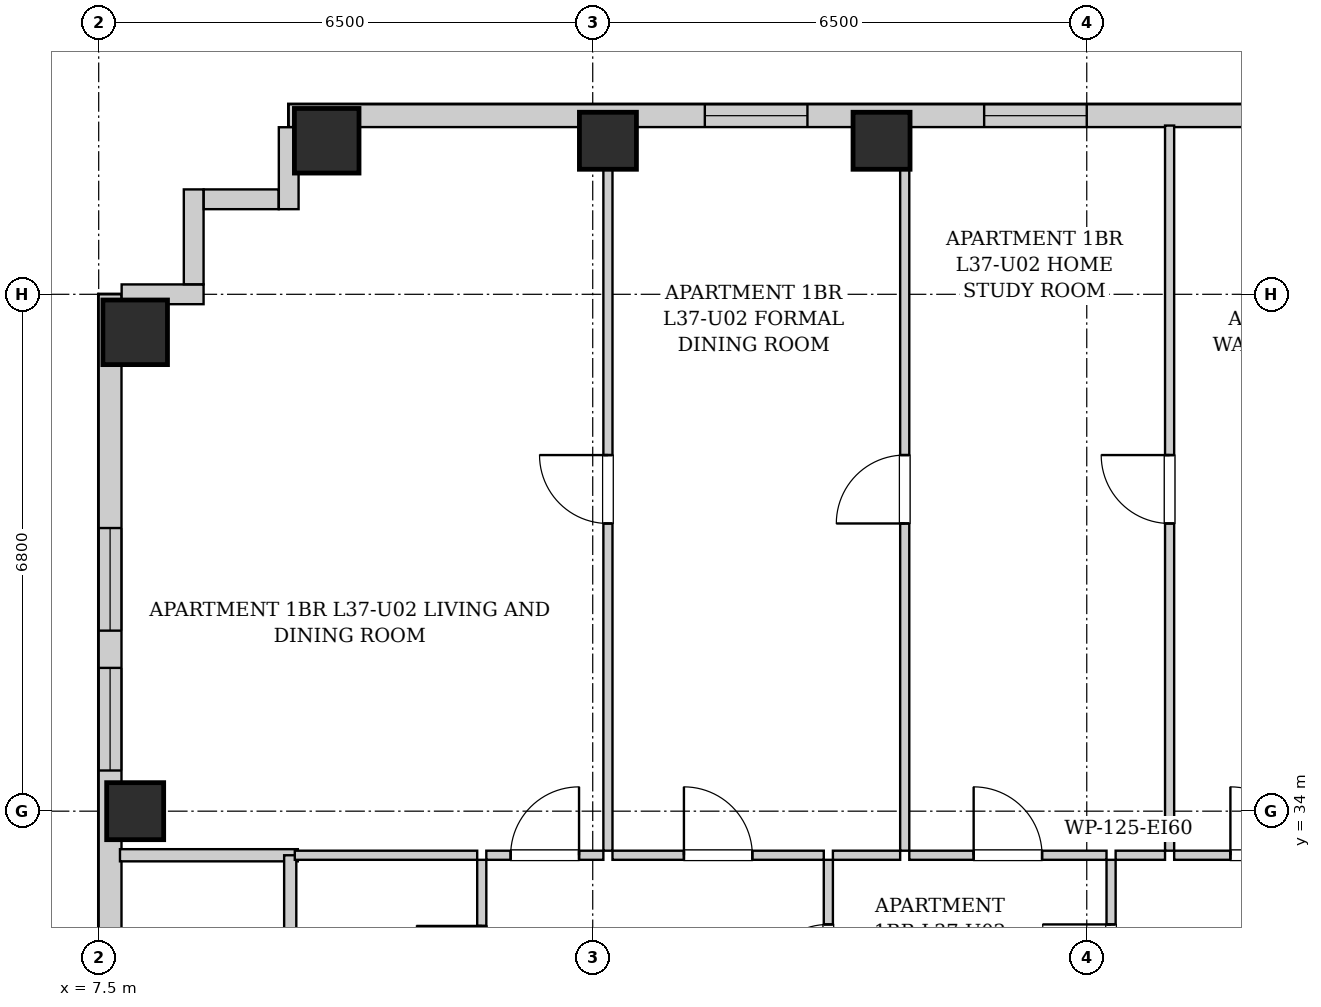
"""IFC4 building model, lengths in metres.
Left out: names, types, materials, properties, quantities, classifications, styles, units other than length and angle.
Written with IfcOpenShell. Run it as: python <this file> out.ifc"""

import sys

from ifc_helpers import new_model, si_unit, direction, frame, frame_2d, origin, origin_2d, place, context, subcontext, project, spatial, rectangle, extrude, element, fill, save


model = new_model("IFC4")
c1 = context("Model", 3, precision=1e-05, world=origin(), true_north=direction((0.0, 1.0)))
c2 = subcontext(c1, "Body", "Model", "MODEL_VIEW")
j1 = project(units=[si_unit("LENGTHUNIT", "METRE"), si_unit("PLANEANGLEUNIT", "RADIAN")], contexts=[c1])
p1 = place(None, origin())
s1 = spatial("IfcSite", under=j1, at=p1, CompositionType="ELEMENT")
p2 = place(p1, origin())
s2 = spatial("IfcBuilding", under=s1, at=p2, CompositionType="ELEMENT")
p3 = place(p2, frame((0.0, 0.0, 130.9)))
s3 = spatial("IfcBuildingStorey", under=s2, at=p3, CompositionType="ELEMENT", Elevation=130.9)
p4 = place(p3, frame((10.5, 42.82, 0.0), z_axis=(0.0, 0.0, 1.0), x_axis=(1.0, 0.0, 0.0)))
e1 = element("IfcColumn", 1, at=p4, inside=s3, PredefinedType="COLUMN", context=c2, shape_type="SweptSolid", body=[
    extrude(rectangle(XDim=0.85, YDim=0.85, at=origin_2d()), origin(), (0.0, 0.0, 1.0), 3.25),
])
for number, where, z_axis, x_axis in (
    (2, (14.2, 42.82, 0.0), (0.0, 0.0, 1.0), (1.0, 0.0, 0.0)),
    (3, (17.8, 42.82, 0.0), (0.0, 0.0, 1.0), (1.0, 0.0, 0.0)),
    (4, (7.98, 34.0, 0.0), (0.0, 0.0, 1.0), (1.0, 0.0, 0.0)),
):
    element("IfcColumn", number, at=place(p3, frame(where, z_axis=z_axis, x_axis=x_axis)), inside=s3, PredefinedType="COLUMN", context=c2, shape_type="SweptSolid", body=[
        extrude(rectangle(XDim=0.75, YDim=0.75, at=origin_2d()), origin(), (0.0, 0.0, 1.0), 3.25),
    ])
p5 = place(p3, frame((7.98, 40.3, 0.0), z_axis=(0.0, 0.0, 1.0), x_axis=(1.0, 0.0, 0.0)))
e5 = element("IfcColumn", 5, at=p5, inside=s3, PredefinedType="COLUMN", context=c2, shape_type="SweptSolid", body=[
    extrude(rectangle(XDim=0.85, YDim=0.85, at=origin_2d()), origin(), (0.0, 0.0, 1.0), 3.25),
])
p6 = place(p3, frame((10.0, 43.15, 0.0), z_axis=(0.0, 0.0, 1.0), x_axis=(1.0, 0.0, 0.0)))
e6 = element("IfcWall", 6, at=p6, inside=s3, PredefinedType="SOLIDWALL", context=c2, shape_type="SweptSolid", body=[
    extrude(rectangle(XDim=21.9, YDim=0.3, at=frame_2d((10.95, 0.0))), origin(), (0.0, 0.0, 1.0), 2.99),
])
p7 = place(p6, frame((5.475, 0.0, 0.55)))
e7 = element("IfcOpeningElement", 7, at=p7, cuts=e6, PredefinedType="OPENING", context=c2, shape_type="SweptSolid", body=[
    extrude(rectangle(XDim=1.35, YDim=1.2, at=frame_2d((0.675, 0.6))), frame((0.0, 0.16, 0.0), z_axis=(0.0, -1.0, 0.0), x_axis=(1.0, 0.0, 0.0)), (0.0, 0.0, 1.0), 0.32),
])
p8 = place(p6, frame((9.15, 0.0, 0.55)))
e8 = element("IfcOpeningElement", 8, at=p8, cuts=e6, PredefinedType="OPENING", context=c2, shape_type="SweptSolid", body=[
    extrude(rectangle(XDim=1.35, YDim=1.2, at=frame_2d((0.675, 0.6))), frame((0.0, 0.16, 0.0), z_axis=(0.0, -1.0, 0.0), x_axis=(1.0, 0.0, 0.0)), (0.0, 0.0, 1.0), 0.32),
])
p9 = place(p6, frame((17.5, 0.0, 0.55)))
e9 = element("IfcOpeningElement", 9, at=p9, cuts=e6, PredefinedType="OPENING", context=c2, shape_type="SweptSolid", body=[
    extrude(rectangle(XDim=1.35, YDim=1.2, at=frame_2d((0.675, 0.6))), frame((0.0, 0.16, 0.0), z_axis=(0.0, -1.0, 0.0), x_axis=(1.0, 0.0, 0.0)), (0.0, 0.0, 1.0), 0.32),
])
p10 = place(p6, frame((19.8, 0.0, 0.55)))
e10 = element("IfcOpeningElement", 10, at=p10, cuts=e6, PredefinedType="OPENING", context=c2, shape_type="SweptSolid", body=[
    extrude(rectangle(XDim=1.35, YDim=1.2, at=frame_2d((0.675, 0.6))), frame((0.0, 0.16, 0.0), z_axis=(0.0, -1.0, 0.0), x_axis=(1.0, 0.0, 0.0)), (0.0, 0.0, 1.0), 0.32),
])
p11 = place(p3, frame((7.65, 6.3, 0.0), z_axis=(0.0, 0.0, 1.0), x_axis=(0.0, 1.0, 0.0)))
e11 = element("IfcWall", 11, at=p11, inside=s3, PredefinedType="SOLIDWALL", context=c2, shape_type="SweptSolid", body=[
    extrude(rectangle(XDim=34.5, YDim=0.3, at=frame_2d((17.25, 0.0))), origin(), (0.0, 0.0, 1.0), 2.99),
])
p12 = place(p11, frame((1.575, 0.0, 0.55)))
e12 = element("IfcOpeningElement", 12, at=p12, cuts=e11, PredefinedType="OPENING", context=c2, shape_type="SweptSolid", body=[
    extrude(rectangle(XDim=1.35, YDim=1.2, at=frame_2d((0.675, 0.6))), frame((0.0, 0.16, 0.0), z_axis=(0.0, -1.0, 0.0), x_axis=(1.0, 0.0, 0.0)), (0.0, 0.0, 1.0), 0.32),
])
p13 = place(p11, frame((30.075, 0.0, 0.55)))
e13 = element("IfcOpeningElement", 13, at=p13, cuts=e11, PredefinedType="OPENING", context=c2, shape_type="SweptSolid", body=[
    extrude(rectangle(XDim=1.35, YDim=1.2, at=frame_2d((0.675, 0.6))), frame((0.0, 0.16, 0.0), z_axis=(0.0, -1.0, 0.0), x_axis=(1.0, 0.0, 0.0)), (0.0, 0.0, 1.0), 0.32),
])
p14 = place(p11, frame((28.235, 0.0, 0.55)))
e14 = element("IfcOpeningElement", 14, at=p14, cuts=e11, PredefinedType="OPENING", context=c2, shape_type="SweptSolid", body=[
    extrude(rectangle(XDim=1.35, YDim=1.2, at=frame_2d((0.675, 0.6))), frame((0.0, 0.16, 0.0), z_axis=(0.0, -1.0, 0.0), x_axis=(1.0, 0.0, 0.0)), (0.0, 0.0, 1.0), 0.32),
])
p15 = place(p11, frame((11.175, 0.0, 0.55)))
e15 = element("IfcOpeningElement", 15, at=p15, cuts=e11, PredefinedType="OPENING", context=c2, shape_type="SweptSolid", body=[
    extrude(rectangle(XDim=1.35, YDim=1.2, at=frame_2d((0.675, 0.6))), frame((0.0, 0.16, 0.0), z_axis=(0.0, -1.0, 0.0), x_axis=(1.0, 0.0, 0.0)), (0.0, 0.0, 1.0), 0.32),
])
p16 = place(p11, frame((9.235, 0.0, 0.55)))
e16 = element("IfcOpeningElement", 16, at=p16, cuts=e11, PredefinedType="OPENING", context=c2, shape_type="SweptSolid", body=[
    extrude(rectangle(XDim=1.35, YDim=1.2, at=frame_2d((0.675, 0.6))), frame((0.0, 0.16, 0.0), z_axis=(0.0, -1.0, 0.0), x_axis=(1.0, 0.0, 0.0)), (0.0, 0.0, 1.0), 0.32),
])
p17 = place(p11, frame((18.2, 0.0, 0.55)))
e17 = element("IfcOpeningElement", 17, at=p17, cuts=e11, PredefinedType="OPENING", context=c2, shape_type="SweptSolid", body=[
    extrude(rectangle(XDim=1.35, YDim=1.2, at=frame_2d((0.675, 0.6))), frame((0.0, 0.16, 0.0), z_axis=(0.0, -1.0, 0.0), x_axis=(1.0, 0.0, 0.0)), (0.0, 0.0, 1.0), 0.32),
])
p18 = place(p11, frame((19.81, 0.0, 0.55)))
e18 = element("IfcOpeningElement", 18, at=p18, cuts=e11, PredefinedType="OPENING", context=c2, shape_type="SweptSolid", body=[
    extrude(rectangle(XDim=1.35, YDim=1.2, at=frame_2d((0.675, 0.6))), frame((0.0, 0.16, 0.0), z_axis=(0.0, -1.0, 0.0), x_axis=(1.0, 0.0, 0.0)), (0.0, 0.0, 1.0), 0.32),
])
p19 = place(p3, frame((7.802, 40.8, 0.0), z_axis=(0.0, 0.0, 1.0), x_axis=(1.0, 0.0, 0.0)))
e19 = element("IfcWall", 19, at=p19, inside=s3, PredefinedType="SOLIDWALL", context=c2, shape_type="SweptSolid", body=[
    extrude(rectangle(XDim=1.078, YDim=0.26, at=frame_2d((0.539, 0.0))), origin(), (0.0, 0.0, 1.0), 2.99),
])
p20 = place(p3, frame((8.75, 40.932, 0.0), z_axis=(0.0, 0.0, 1.0), x_axis=(0.0, 1.0, 0.0)))
e20 = element("IfcWall", 20, at=p20, inside=s3, PredefinedType="SOLIDWALL", context=c2, shape_type="SweptSolid", body=[
    extrude(rectangle(XDim=1.248, YDim=0.26, at=frame_2d((0.624, 0.0))), origin(), (0.0, 0.0, 1.0), 2.99),
])
p21 = place(p3, frame((8.882, 42.05, 0.0), z_axis=(0.0, 0.0, 1.0), x_axis=(1.0, 0.0, 0.0)))
e21 = element("IfcWall", 21, at=p21, inside=s3, PredefinedType="SOLIDWALL", context=c2, shape_type="SweptSolid", body=[
    extrude(rectangle(XDim=0.986, YDim=0.26, at=frame_2d((0.493, 0.0))), origin(), (0.0, 0.0, 1.0), 2.99),
])
p22 = place(p3, frame((10.0, 41.92, 0.0), z_axis=(0.0, 0.0, 1.0), x_axis=(0.0, 1.0, 0.0)))
e22 = element("IfcWall", 22, at=p22, inside=s3, PredefinedType="SOLIDWALL", context=c2, shape_type="SweptSolid", body=[
    extrude(rectangle(XDim=1.078, YDim=0.26, at=frame_2d((0.539, 0.0))), origin(), (0.0, 0.0, 1.0), 2.99),
])
p23 = place(p3, frame((7.78, 33.42, 0.0), z_axis=(0.0, 0.0, 1.0), x_axis=(1.0, 0.0, 0.0)))
e23 = element("IfcWall", 23, at=p23, inside=s3, PredefinedType="PARTITIONING", context=c2, shape_type="SweptSolid", body=[
    extrude(rectangle(XDim=2.34, YDim=0.16, at=frame_2d((1.17, 0.0))), origin(), (0.0, 0.0, 1.0), 2.99),
])
p24 = place(p3, frame((10.02, 30.76, 0.0), z_axis=(0.0, 0.0, 1.0), x_axis=(0.0, 1.0, 0.0)))
e24 = element("IfcWall", 24, at=p24, inside=s3, PredefinedType="PARTITIONING", context=c2, shape_type="SweptSolid", body=[
    extrude(rectangle(XDim=2.66, YDim=0.16, at=frame_2d((1.33, 0.0))), origin(), (0.0, 0.0, 1.0), 2.99),
])
p25 = place(p3, frame((12.54, 30.76, 0.0), z_axis=(0.0, 0.0, 1.0), x_axis=(0.0, 1.0, 0.0)))
e25 = element("IfcWall", 25, at=p25, inside=s3, PredefinedType="PARTITIONING", context=c2, shape_type="SweptSolid", body=[
    extrude(rectangle(XDim=2.6, YDim=0.12, at=frame_2d((1.3, 0.0))), origin(), (0.0, 0.0, 1.0), 2.99),
])
p26 = place(p25, frame((0.87, 0.0, 0.0)))
e26 = element("IfcOpeningElement", 26, at=p26, cuts=e25, PredefinedType="OPENING", context=c2, shape_type="SweptSolid", body=[
    extrude(rectangle(XDim=0.86, YDim=2.05, at=frame_2d((0.43, 1.025))), frame((0.0, 0.07, 0.0), z_axis=(0.0, -1.0, 0.0), x_axis=(1.0, 0.0, 0.0)), (0.0, 0.0, 1.0), 0.14),
])
p27 = place(p3, frame((10.08, 33.42, 0.0), z_axis=(0.0, 0.0, 1.0), x_axis=(1.0, 0.0, 0.0)))
e27 = element("IfcWall", 27, at=p27, inside=s3, PredefinedType="PARTITIONING", context=c2, shape_type="SweptSolid", body=[
    extrude(rectangle(XDim=2.4, YDim=0.12, at=frame_2d((1.2, 0.0))), origin(), (0.0, 0.0, 1.0), 2.99),
])
p28 = place(p3, frame((17.1, 30.76, 0.0), z_axis=(0.0, 0.0, 1.0), x_axis=(0.0, 1.0, 0.0)))
e28 = element("IfcWall", 28, at=p28, inside=s3, PredefinedType="PARTITIONING", context=c2, shape_type="SweptSolid", body=[
    extrude(rectangle(XDim=2.6, YDim=0.12, at=frame_2d((1.3, 0.0))), origin(), (0.0, 0.0, 1.0), 2.99),
])
p29 = place(p28, frame((0.85, 0.0, 0.0)))
e29 = element("IfcOpeningElement", 29, at=p29, cuts=e28, PredefinedType="OPENING", context=c2, shape_type="SweptSolid", body=[
    extrude(rectangle(XDim=0.9, YDim=2.05, at=frame_2d((0.45, 1.025))), frame((0.0, 0.07, 0.0), z_axis=(0.0, -1.0, 0.0), x_axis=(1.0, 0.0, 0.0)), (0.0, 0.0, 1.0), 0.14),
])
p30 = place(p3, frame((12.6, 33.42, 0.0), z_axis=(0.0, 0.0, 1.0), x_axis=(1.0, 0.0, 0.0)))
e30 = element("IfcWall", 30, at=p30, inside=s3, PredefinedType="PARTITIONING", context=c2, shape_type="SweptSolid", body=[
    extrude(rectangle(XDim=1.54, YDim=0.12, at=frame_2d((0.77, 0.0))), origin(), (0.0, 0.0, 1.0), 2.99),
])
p31 = place(p30, frame((0.32, 0.0, 0.0)))
e31 = element("IfcOpeningElement", 31, at=p31, cuts=e30, PredefinedType="OPENING", context=c2, shape_type="SweptSolid", body=[
    extrude(rectangle(XDim=0.9, YDim=2.05, at=frame_2d((0.45, 1.025))), frame((0.0, 0.07, 0.0), z_axis=(0.0, -1.0, 0.0), x_axis=(1.0, 0.0, 0.0)), (0.0, 0.0, 1.0), 0.14),
])
p32 = place(p3, frame((14.26, 33.42, 0.0), z_axis=(0.0, 0.0, 1.0), x_axis=(1.0, 0.0, 0.0)))
e32 = element("IfcWall", 32, at=p32, inside=s3, PredefinedType="PARTITIONING", context=c2, shape_type="SweptSolid", body=[
    extrude(rectangle(XDim=2.78, YDim=0.12, at=frame_2d((1.39, 0.0))), origin(), (0.0, 0.0, 1.0), 2.99),
])
p33 = place(p32, frame((0.94, 0.0, 0.0)))
e33 = element("IfcOpeningElement", 33, at=p33, cuts=e32, PredefinedType="OPENING", context=c2, shape_type="SweptSolid", body=[
    extrude(rectangle(XDim=0.9, YDim=2.05, at=frame_2d((0.45, 1.025))), frame((0.0, 0.07, 0.0), z_axis=(0.0, -1.0, 0.0), x_axis=(1.0, 0.0, 0.0)), (0.0, 0.0, 1.0), 0.14),
])
p34 = place(p3, frame((20.82, 30.76, 0.0), z_axis=(0.0, 0.0, 1.0), x_axis=(0.0, 1.0, 0.0)))
e34 = element("IfcWall", 34, at=p34, inside=s3, PredefinedType="PARTITIONING", context=c2, shape_type="SweptSolid", body=[
    extrude(rectangle(XDim=2.6, YDim=0.12, at=frame_2d((1.3, 0.0))), origin(), (0.0, 0.0, 1.0), 2.99),
])
p35 = place(p34, frame((0.85, 0.0, 0.0)))
e35 = element("IfcOpeningElement", 35, at=p35, cuts=e34, PredefinedType="OPENING", context=c2, shape_type="SweptSolid", body=[
    extrude(rectangle(XDim=0.9, YDim=2.05, at=frame_2d((0.45, 1.025))), frame((0.0, 0.07, 0.0), z_axis=(0.0, -1.0, 0.0), x_axis=(1.0, 0.0, 0.0)), (0.0, 0.0, 1.0), 0.14),
])
p36 = place(p3, frame((17.16, 33.42, 0.0), z_axis=(0.0, 0.0, 1.0), x_axis=(1.0, 0.0, 0.0)))
e36 = element("IfcWall", 36, at=p36, inside=s3, PredefinedType="PARTITIONING", context=c2, shape_type="SweptSolid", body=[
    extrude(rectangle(XDim=0.885, YDim=0.12, at=frame_2d((0.442, 0.0))), origin(), (0.0, 0.0, 1.0), 2.99),
])
p37 = place(p3, frame((18.165, 33.42, 0.0), z_axis=(0.0, 0.0, 1.0), x_axis=(1.0, 0.0, 0.0)))
e37 = element("IfcWall", 37, at=p37, inside=s3, PredefinedType="PARTITIONING", context=c2, shape_type="SweptSolid", body=[
    extrude(rectangle(XDim=2.595, YDim=0.12, at=frame_2d((1.297, 0.0))), origin(), (0.0, 0.0, 1.0), 2.99),
])
p38 = place(p37, frame((0.847, 0.0, 0.0)))
e38 = element("IfcOpeningElement", 38, at=p38, cuts=e37, PredefinedType="OPENING", context=c2, shape_type="SweptSolid", body=[
    extrude(rectangle(XDim=0.9, YDim=2.05, at=frame_2d((0.45, 1.025))), frame((0.0, 0.07, 0.0), z_axis=(0.0, -1.0, 0.0), x_axis=(1.0, 0.0, 0.0)), (0.0, 0.0, 1.0), 0.14),
])
p39 = place(p3, frame((20.88, 33.42, 0.0), z_axis=(0.0, 0.0, 1.0), x_axis=(1.0, 0.0, 0.0)))
e39 = element("IfcWall", 39, at=p39, inside=s3, PredefinedType="PARTITIONING", context=c2, shape_type="SweptSolid", body=[
    extrude(rectangle(XDim=0.65, YDim=0.12, at=frame_2d((0.325, 0.0))), origin(), (0.0, 0.0, 1.0), 2.99),
])
p40 = place(p3, frame((21.65, 33.42, 0.0), z_axis=(0.0, 0.0, 1.0), x_axis=(1.0, 0.0, 0.0)))
e40 = element("IfcWall", 40, at=p40, inside=s3, PredefinedType="PARTITIONING", context=c2, shape_type="SweptSolid", body=[
    extrude(rectangle(XDim=2.38, YDim=0.12, at=frame_2d((1.19, 0.0))), origin(), (0.0, 0.0, 1.0), 2.99),
])
p41 = place(p40, frame((0.74, 0.0, 0.0)))
e41 = element("IfcOpeningElement", 41, at=p41, cuts=e40, PredefinedType="OPENING", context=c2, shape_type="SweptSolid", body=[
    extrude(rectangle(XDim=0.9, YDim=2.05, at=frame_2d((0.45, 1.025))), frame((0.0, 0.07, 0.0), z_axis=(0.0, -1.0, 0.0), x_axis=(1.0, 0.0, 0.0)), (0.0, 0.0, 1.0), 0.14),
])
p42 = place(p3, frame((14.2, 33.48, 0.0), z_axis=(0.0, 0.0, 1.0), x_axis=(0.0, 1.0, 0.0)))
e42 = element("IfcWall", 42, at=p42, inside=s3, PredefinedType="PARTITIONING", context=c2, shape_type="SweptSolid", body=[
    extrude(rectangle(XDim=9.54, YDim=0.12, at=frame_2d((4.77, 0.0))), origin(), (0.0, 0.0, 1.0), 2.99),
])
p43 = place(p42, frame((4.305, 0.0, 0.0)))
e43 = element("IfcOpeningElement", 43, at=p43, cuts=e42, PredefinedType="OPENING", context=c2, shape_type="SweptSolid", body=[
    extrude(rectangle(XDim=0.9, YDim=2.05, at=frame_2d((0.45, 1.025))), frame((0.0, 0.07, 0.0), z_axis=(0.0, -1.0, 0.0), x_axis=(1.0, 0.0, 0.0)), (0.0, 0.0, 1.0), 0.14),
])
p44 = place(p3, frame((18.105, 33.48, 0.0), z_axis=(0.0, 0.0, 1.0), x_axis=(0.0, 1.0, 0.0)))
e44 = element("IfcWall", 44, at=p44, inside=s3, PredefinedType="PARTITIONING", context=c2, shape_type="SweptSolid", body=[
    extrude(rectangle(XDim=9.54, YDim=0.12, at=frame_2d((4.77, 0.0))), origin(), (0.0, 0.0, 1.0), 2.99),
])
p45 = place(p44, frame((4.305, 0.0, 0.0)))
e45 = element("IfcOpeningElement", 45, at=p45, cuts=e44, PredefinedType="OPENING", context=c2, shape_type="SweptSolid", body=[
    extrude(rectangle(XDim=0.9, YDim=2.05, at=frame_2d((0.45, 1.025))), frame((0.0, 0.07, 0.0), z_axis=(0.0, -1.0, 0.0), x_axis=(1.0, 0.0, 0.0)), (0.0, 0.0, 1.0), 0.14),
])
p46 = place(p3, frame((21.59, 33.48, 0.0), z_axis=(0.0, 0.0, 1.0), x_axis=(0.0, 1.0, 0.0)))
e46 = element("IfcWall", 46, at=p46, inside=s3, PredefinedType="PARTITIONING", context=c2, shape_type="SweptSolid", body=[
    extrude(rectangle(XDim=9.54, YDim=0.12, at=frame_2d((4.77, 0.0))), origin(), (0.0, 0.0, 1.0), 2.99),
])
p47 = place(p46, frame((4.305, 0.0, 0.0)))
e47 = element("IfcOpeningElement", 47, at=p47, cuts=e46, PredefinedType="OPENING", context=c2, shape_type="SweptSolid", body=[
    extrude(rectangle(XDim=0.9, YDim=2.05, at=frame_2d((0.45, 1.025))), frame((0.0, 0.07, 0.0), z_axis=(0.0, -1.0, 0.0), x_axis=(1.0, 0.0, 0.0)), (0.0, 0.0, 1.0), 0.14),
])
p48 = place(p26, origin())
e48 = element("IfcDoor", 48, at=p48, inside=s3, OperationType="SINGLE_SWING_RIGHT", PredefinedType="DOOR", context=c2, shape_type="SweptSolid", body=[
    extrude(rectangle(XDim=0.86, YDim=2.05, at=frame_2d((0.43, 1.025))), frame((0.0, 0.025, 0.0), z_axis=(0.0, -1.0, 0.0), x_axis=(1.0, 0.0, 0.0)), (0.0, 0.0, 1.0), 0.05),
])
fill(e26, e48)
p49 = place(p29, origin())
e49 = element("IfcDoor", 49, at=p49, inside=s3, OperationType="SINGLE_SWING_LEFT", PredefinedType="DOOR", context=c2, shape_type="SweptSolid", body=[
    extrude(rectangle(XDim=0.9, YDim=2.05, at=frame_2d((0.45, 1.025))), frame((0.0, 0.025, 0.0), z_axis=(0.0, -1.0, 0.0), x_axis=(1.0, 0.0, 0.0)), (0.0, 0.0, 1.0), 0.05),
])
fill(e29, e49)
p50 = place(p31, origin())
e50 = element("IfcDoor", 50, at=p50, inside=s3, OperationType="SINGLE_SWING_RIGHT", PredefinedType="DOOR", context=c2, shape_type="SweptSolid", body=[
    extrude(rectangle(XDim=0.9, YDim=2.05, at=frame_2d((0.45, 1.025))), frame((0.0, 0.025, 0.0), z_axis=(0.0, -1.0, 0.0), x_axis=(1.0, 0.0, 0.0)), (0.0, 0.0, 1.0), 0.05),
])
fill(e31, e50)
p51 = place(p33, origin())
e51 = element("IfcDoor", 51, at=p51, inside=s3, OperationType="SINGLE_SWING_LEFT", PredefinedType="DOOR", context=c2, shape_type="SweptSolid", body=[
    extrude(rectangle(XDim=0.9, YDim=2.05, at=frame_2d((0.45, 1.025))), frame((0.0, 0.025, 0.0), z_axis=(0.0, -1.0, 0.0), x_axis=(1.0, 0.0, 0.0)), (0.0, 0.0, 1.0), 0.05),
])
fill(e33, e51)
p52 = place(p35, origin())
e52 = element("IfcDoor", 52, at=p52, inside=s3, OperationType="SINGLE_SWING_RIGHT", PredefinedType="DOOR", context=c2, shape_type="SweptSolid", body=[
    extrude(rectangle(XDim=0.9, YDim=2.05, at=frame_2d((0.45, 1.025))), frame((0.0, 0.025, 0.0), z_axis=(0.0, -1.0, 0.0), x_axis=(1.0, 0.0, 0.0)), (0.0, 0.0, 1.0), 0.05),
])
fill(e35, e52)
p53 = place(p38, origin())
e53 = element("IfcDoor", 53, at=p53, inside=s3, OperationType="SINGLE_SWING_LEFT", PredefinedType="DOOR", context=c2, shape_type="SweptSolid", body=[
    extrude(rectangle(XDim=0.9, YDim=2.05, at=frame_2d((0.45, 1.025))), frame((0.0, 0.025, 0.0), z_axis=(0.0, -1.0, 0.0), x_axis=(1.0, 0.0, 0.0)), (0.0, 0.0, 1.0), 0.05),
])
fill(e38, e53)
p54 = place(p41, origin())
e54 = element("IfcDoor", 54, at=p54, inside=s3, OperationType="SINGLE_SWING_LEFT", PredefinedType="DOOR", context=c2, shape_type="SweptSolid", body=[
    extrude(rectangle(XDim=0.9, YDim=2.05, at=frame_2d((0.45, 1.025))), frame((0.0, 0.025, 0.0), z_axis=(0.0, -1.0, 0.0), x_axis=(1.0, 0.0, 0.0)), (0.0, 0.0, 1.0), 0.05),
])
fill(e41, e54)
p55 = place(p43, origin())
e55 = element("IfcDoor", 55, at=p55, inside=s3, OperationType="SINGLE_SWING_RIGHT", PredefinedType="DOOR", context=c2, shape_type="SweptSolid", body=[
    extrude(rectangle(XDim=0.9, YDim=2.05, at=frame_2d((0.45, 1.025))), frame((0.0, 0.025, 0.0), z_axis=(0.0, -1.0, 0.0), x_axis=(1.0, 0.0, 0.0)), (0.0, 0.0, 1.0), 0.05),
])
fill(e43, e55)
p56 = place(p45, origin())
e56 = element("IfcDoor", 56, at=p56, inside=s3, OperationType="SINGLE_SWING_LEFT", PredefinedType="DOOR", context=c2, shape_type="SweptSolid", body=[
    extrude(rectangle(XDim=0.9, YDim=2.05, at=frame_2d((0.45, 1.025))), frame((0.0, 0.025, 0.0), z_axis=(0.0, -1.0, 0.0), x_axis=(1.0, 0.0, 0.0)), (0.0, 0.0, 1.0), 0.05),
])
fill(e45, e56)
p57 = place(p47, origin())
e57 = element("IfcDoor", 57, at=p57, inside=s3, OperationType="SINGLE_SWING_RIGHT", PredefinedType="DOOR", context=c2, shape_type="SweptSolid", body=[
    extrude(rectangle(XDim=0.9, YDim=2.05, at=frame_2d((0.45, 1.025))), frame((0.0, 0.025, 0.0), z_axis=(0.0, -1.0, 0.0), x_axis=(1.0, 0.0, 0.0)), (0.0, 0.0, 1.0), 0.05),
])
fill(e47, e57)
p58 = place(p13, origin())
e58 = element("IfcWindow", 58, at=p58, inside=s3, PartitioningType="SINGLE_PANEL", PredefinedType="WINDOW", context=c2, shape_type="SweptSolid", body=[
    extrude(rectangle(XDim=1.35, YDim=1.2, at=frame_2d((0.675, 0.6))), frame((0.0, 0.03, 0.0), z_axis=(0.0, -1.0, 0.0), x_axis=(1.0, 0.0, 0.0)), (0.0, 0.0, 1.0), 0.06),
])
fill(e13, e58)
p59 = place(p14, origin())
e59 = element("IfcWindow", 59, at=p59, inside=s3, PartitioningType="SINGLE_PANEL", PredefinedType="WINDOW", context=c2, shape_type="SweptSolid", body=[
    extrude(rectangle(XDim=1.35, YDim=1.2, at=frame_2d((0.675, 0.6))), frame((0.0, 0.03, 0.0), z_axis=(0.0, -1.0, 0.0), x_axis=(1.0, 0.0, 0.0)), (0.0, 0.0, 1.0), 0.06),
])
fill(e14, e59)
p60 = place(p7, origin())
e60 = element("IfcWindow", 60, at=p60, inside=s3, PartitioningType="SINGLE_PANEL", PredefinedType="WINDOW", context=c2, shape_type="SweptSolid", body=[
    extrude(rectangle(XDim=1.35, YDim=1.2, at=frame_2d((0.675, 0.6))), frame((0.0, 0.03, 0.0), z_axis=(0.0, -1.0, 0.0), x_axis=(1.0, 0.0, 0.0)), (0.0, 0.0, 1.0), 0.06),
])
fill(e7, e60)
p61 = place(p8, origin())
e61 = element("IfcWindow", 61, at=p61, inside=s3, PartitioningType="SINGLE_PANEL", PredefinedType="WINDOW", context=c2, shape_type="SweptSolid", body=[
    extrude(rectangle(XDim=1.35, YDim=1.2, at=frame_2d((0.675, 0.6))), frame((0.0, 0.03, 0.0), z_axis=(0.0, -1.0, 0.0), x_axis=(1.0, 0.0, 0.0)), (0.0, 0.0, 1.0), 0.06),
])
fill(e8, e61)
save(model, sys.argv[1])
